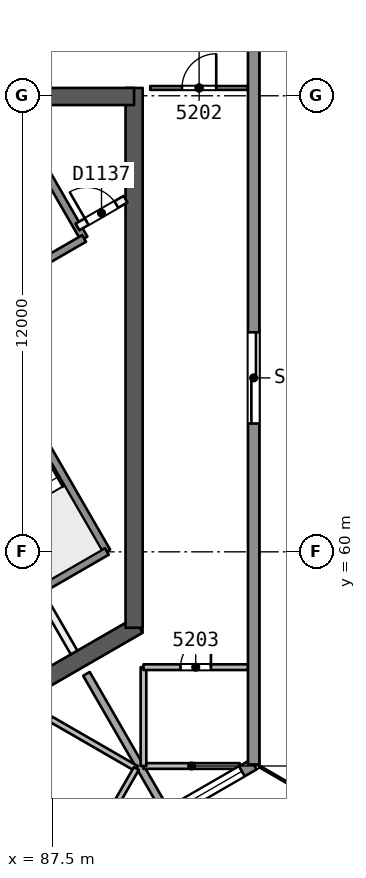
"""IFC4 building model, lengths in metres.
Left out: names, types, materials, properties, quantities, classifications, styles, units other than length and angle.
Written with IfcOpenShell. Run it as: python <this file> out.ifc"""

import sys

from ifc_helpers import new_model, si_unit, direction, frame, frame_2d, origin, place, context, subcontext, project, spatial, rectangle, extrude, element, fill, save


model = new_model("IFC4")
c1 = context("Model", 3, precision=1e-05, world=origin(), true_north=direction((0.0, 1.0)))
c2 = subcontext(c1, "Body", "Model", "MODEL_VIEW")
j1 = project(units=[si_unit("LENGTHUNIT", "METRE"), si_unit("PLANEANGLEUNIT", "RADIAN")], contexts=[c1])
p1 = place(None, origin())
s1 = spatial("IfcSite", under=j1, at=p1, CompositionType="ELEMENT")
p2 = place(p1, origin())
s2 = spatial("IfcBuilding", under=s1, at=p2, CompositionType="ELEMENT")
p3 = place(p2, frame((0.0, 0.0, 213.2)))
s3 = spatial("IfcBuildingStorey", under=s2, at=p3, CompositionType="ELEMENT", Elevation=213.2)
p4 = place(p3, frame((86.723, 56.31, 0.0), z_axis=(0.0, 0.0, 1.0), x_axis=(0.866042179588, 0.49997094233, 0.0)))
e1 = element("IfcWall", 1, at=p4, inside=s3, PredefinedType="SHEAR", context=c2, shape_type="SweptSolid", body=[
    extrude(rectangle(XDim=3.515, YDim=0.45, at=frame_2d((1.758, 0.0))), origin(), (0.0, 0.0, 1.0), 3.7),
])
p5 = place(p3, frame((89.655, 58.002, 0.0), z_axis=(0.0, 0.0, 1.0), x_axis=(0.0, 1.0, 0.0)))
e2 = element("IfcWall", 2, at=p5, inside=s3, PredefinedType="SHEAR", context=c2, shape_type="SweptSolid", body=[
    extrude(rectangle(XDim=14.204, YDim=0.45, at=frame_2d((7.102, 0.0))), origin(), (0.0, 0.0, 1.0), 3.7),
])
p6 = place(p3, frame((89.655, 71.981, 0.0), z_axis=(0.0, 0.0, 1.0), x_axis=(-1.0, 0.0, 0.0)))
e3 = element("IfcWall", 3, at=p6, inside=s3, PredefinedType="SHEAR", context=c2, shape_type="SweptSolid", body=[
    extrude(rectangle(XDim=10.155, YDim=0.45, at=frame_2d((5.078, 0.0))), origin(), (0.0, 0.0, 1.0), 3.7),
])
p7 = place(p6, frame((8.005, 0.0, 0.0)))
e4 = element("IfcOpeningElement", 4, at=p7, cuts=e3, PredefinedType="OPENING", context=c2, shape_type="SweptSolid", body=[
    extrude(rectangle(XDim=1.2, YDim=2.1, at=frame_2d((0.6, 1.05))), frame((0.0, 0.235, 0.0), z_axis=(0.0, -1.0, 0.0), x_axis=(1.0, 0.0, 0.0)), (0.0, 0.0, 1.0), 0.471),
])
p8 = place(p3, frame((90.079, 72.206, 0.0), z_axis=(0.0, 0.0, 1.0), x_axis=(1.0, 0.0, 0.0)))
e5 = element("IfcWall", 5, at=p8, inside=s3, PredefinedType="PARTITIONING", context=c2, shape_type="SweptSolid", body=[
    extrude(rectangle(XDim=2.573, YDim=0.1, at=frame_2d((1.287, 0.0))), origin(), (0.0, 0.0, 1.0), 3.3),
])
p9 = place(p8, frame((0.837, 0.0, 0.0)))
e6 = element("IfcOpeningElement", 6, at=p9, cuts=e5, PredefinedType="OPENING", context=c2, shape_type="SweptSolid", body=[
    extrude(rectangle(XDim=0.9, YDim=2.1, at=frame_2d((0.45, 1.05))), frame((0.0, 0.061, 0.0), z_axis=(0.0, -1.0, 0.0), x_axis=(1.0, 0.0, 0.0)), (0.0, 0.0, 1.0), 0.121),
])
p10 = place(p3, frame((92.436, 54.365, 0.0), z_axis=(0.0, 0.0, 1.0), x_axis=(-1.0, 0.0, 0.0)))
e7 = element("IfcWall", 7, at=p10, inside=s3, PredefinedType="PARTITIONING", context=c2, shape_type="SweptSolid", body=[
    extrude(rectangle(XDim=2.534, YDim=0.15, at=frame_2d((1.267, 0.0))), origin(), (0.0, 0.0, 1.0), 3.3),
])
p11 = place(p3, frame((89.902, 54.365, 0.0), z_axis=(0.0, 0.0, 1.0), x_axis=(0.0, 1.0, 0.0)))
e8 = element("IfcWall", 8, at=p11, inside=s3, PredefinedType="PARTITIONING", context=c2, shape_type="SweptSolid", body=[
    extrude(rectangle(XDim=2.6, YDim=0.15, at=frame_2d((1.3, 0.0))), origin(), (0.0, 0.0, 1.0), 3.3),
])
p12 = place(p3, frame((89.902, 56.965, 0.0), z_axis=(0.0, 0.0, 1.0), x_axis=(1.0, 0.0, 0.0)))
e9 = element("IfcWall", 9, at=p12, inside=s3, PredefinedType="PARTITIONING", context=c2, shape_type="SweptSolid", body=[
    extrude(rectangle(XDim=2.751, YDim=0.15, at=frame_2d((1.375, 0.0))), origin(), (0.0, 0.0, 1.0), 3.3),
])
p13 = place(p12, frame((0.975, 0.0, 0.0)))
e10 = element("IfcOpeningElement", 10, at=p13, cuts=e9, PredefinedType="OPENING", context=c2, shape_type="SweptSolid", body=[
    extrude(rectangle(XDim=0.8, YDim=2.1, at=frame_2d((0.4, 1.05))), frame((0.0, 0.085, 0.0), z_axis=(0.0, -1.0, 0.0), x_axis=(1.0, 0.0, 0.0)), (0.0, 0.0, 1.0), 0.171),
])
p14 = place(p3, frame((88.401, 56.789, 0.0), z_axis=(0.0, 0.0, 1.0), x_axis=(0.499979154163, -0.8660374388, 0.0)))
e11 = element("IfcWall", 11, at=p14, inside=s3, PredefinedType="PARTITIONING", context=c2, shape_type="SweptSolid", body=[
    extrude(rectangle(XDim=4.116, YDim=0.2, at=frame_2d((2.058, 0.0))), origin(), (0.0, 0.0, 1.0), 3.3),
])
p15 = place(p3, frame((86.087, 53.216, 0.0), z_axis=(0.0, 0.0, 1.0), x_axis=(0.500052815053, 0.865994908852, 0.0)))
e12 = element("IfcWall", 12, at=p15, inside=s3, PredefinedType="PARTITIONING", context=c2, shape_type="SweptSolid", body=[
    extrude(rectangle(XDim=2.751, YDim=0.15, at=frame_2d((1.375, 0.0))), origin(), (0.0, 0.0, 1.0), 3.3),
])
p16 = place(p15, frame((0.975, 0.0, 0.0)))
e13 = element("IfcOpeningElement", 13, at=p16, cuts=e12, PredefinedType="OPENING", context=c2, shape_type="SweptSolid", body=[
    extrude(rectangle(XDim=0.8, YDim=2.1, at=frame_2d((0.4, 1.05))), frame((0.0, 0.085, 0.0), z_axis=(0.0, -1.0, 0.0), x_axis=(1.0, 0.0, 0.0)), (0.0, 0.0, 1.0), 0.171),
])
p17 = place(p3, frame((87.463, 55.598, 0.0), z_axis=(0.0, 0.0, 1.0), x_axis=(0.866062058628, -0.499936506574, 0.0)))
e14 = element("IfcWall", 14, at=p17, inside=s3, PredefinedType="PARTITIONING", context=c2, shape_type="SweptSolid", body=[
    extrude(rectangle(XDim=2.6, YDim=0.15, at=frame_2d((1.3, 0.0))), origin(), (0.0, 0.0, 1.0), 3.3),
])
p18 = place(p3, frame((89.715, 54.298, 0.0), z_axis=(0.0, 0.0, 1.0), x_axis=(-0.50006051662, -0.865990461678, 0.0)))
e15 = element("IfcWall", 15, at=p18, inside=s3, PredefinedType="PARTITIONING", context=c2, shape_type="SweptSolid", body=[
    extrude(rectangle(XDim=2.605, YDim=0.15, at=frame_2d((1.302, 0.0))), origin(), (0.0, 0.0, 1.0), 3.3),
])
p19 = place(p3, frame((92.801, 54.404, 0.0), z_axis=(0.0, 0.0, 1.0), x_axis=(-0.866014017669, -0.500019720812, 0.0)))
e16 = element("IfcWall", 16, at=p19, inside=s3, PredefinedType="SOLIDWALL", context=c2, shape_type="SweptSolid", body=[
    extrude(rectangle(XDim=5.237, YDim=0.3, at=frame_2d((2.619, 0.0))), origin(), (0.0, 0.0, 1.0), 3.3),
])
p20 = place(p19, frame((0.358, 0.0, 0.9)))
e17 = element("IfcOpeningElement", 17, at=p20, cuts=e16, PredefinedType="OPENING", context=c2, shape_type="SweptSolid", body=[
    extrude(rectangle(XDim=1.8, YDim=1.5, at=frame_2d((0.9, 0.75))), frame((0.0, 0.161, 0.0), z_axis=(0.0, -1.0, 0.0), x_axis=(1.0, 0.0, 0.0)), (0.0, 0.0, 1.0), 0.321),
])
p21 = place(p19, frame((3.089, 0.0, 0.9)))
e18 = element("IfcOpeningElement", 18, at=p21, cuts=e16, PredefinedType="OPENING", context=c2, shape_type="SweptSolid", body=[
    extrude(rectangle(XDim=1.8, YDim=1.5, at=frame_2d((0.9, 0.75))), frame((0.0, 0.161, 0.0), z_axis=(0.0, -1.0, 0.0), x_axis=(1.0, 0.0, 0.0)), (0.0, 0.0, 1.0), 0.321),
])
p22 = place(p3, frame((92.801, 105.596, 0.0), z_axis=(0.0, 0.0, 1.0), x_axis=(0.0, -1.0, 0.0)))
e19 = element("IfcWall", 19, at=p22, inside=s3, PredefinedType="SOLIDWALL", context=c2, shape_type="SweptSolid", body=[
    extrude(rectangle(XDim=51.191, YDim=0.3, at=frame_2d((25.596, 0.0))), origin(), (0.0, 0.0, 1.0), 3.3),
])
p23 = place(p22, frame((9.996, 0.0, 0.0)))
e20 = element("IfcOpeningElement", 20, at=p23, cuts=e19, PredefinedType="OPENING", context=c2, shape_type="SweptSolid", body=[
    extrude(rectangle(XDim=2.4, YDim=2.4, at=frame_2d((1.2, 1.2))), frame((0.0, 0.161, 0.0), z_axis=(0.0, -1.0, 0.0), x_axis=(1.0, 0.0, 0.0)), (0.0, 0.0, 1.0), 0.321),
])
p24 = place(p22, frame((29.072, 0.0, 0.0)))
e21 = element("IfcOpeningElement", 21, at=p24, cuts=e19, PredefinedType="OPENING", context=c2, shape_type="SweptSolid", body=[
    extrude(rectangle(XDim=2.4, YDim=2.4, at=frame_2d((1.2, 1.2))), frame((0.0, 0.161, 0.0), z_axis=(0.0, -1.0, 0.0), x_axis=(1.0, 0.0, 0.0)), (0.0, 0.0, 1.0), 0.321),
])
p25 = place(p22, frame((39.819, 0.0, 0.0)))
e22 = element("IfcOpeningElement", 22, at=p25, cuts=e19, PredefinedType="OPENING", context=c2, shape_type="SweptSolid", body=[
    extrude(rectangle(XDim=2.4, YDim=2.4, at=frame_2d((1.2, 1.2))), frame((0.0, 0.161, 0.0), z_axis=(0.0, -1.0, 0.0), x_axis=(1.0, 0.0, 0.0)), (0.0, 0.0, 1.0), 0.321),
])
p26 = place(p22, frame((23.616, 0.0, 0.0)))
e23 = element("IfcOpeningElement", 23, at=p26, cuts=e19, PredefinedType="OPENING", context=c2, shape_type="SweptSolid", body=[
    extrude(rectangle(XDim=2.4, YDim=2.4, at=frame_2d((1.2, 1.2))), frame((0.0, 0.161, 0.0), z_axis=(0.0, -1.0, 0.0), x_axis=(1.0, 0.0, 0.0)), (0.0, 0.0, 1.0), 0.321),
])
p27 = place(p3, frame((88.266, 51.786, 0.0), z_axis=(0.0, 0.0, 1.0), x_axis=(-0.866026349667, 0.49999836168, 0.0)))
e24 = element("IfcWall", 24, at=p27, inside=s3, PredefinedType="SOLIDWALL", context=c2, shape_type="SweptSolid", body=[
    extrude(rectangle(XDim=51.192, YDim=0.3, at=frame_2d((25.596, 0.0))), origin(), (0.0, 0.0, 1.0), 3.3),
])
p28 = place(p27, frame((24.864, 0.0, 0.0)))
e25 = element("IfcOpeningElement", 25, at=p28, cuts=e24, PredefinedType="OPENING", context=c2, shape_type="SweptSolid", body=[
    extrude(rectangle(XDim=2.4, YDim=2.4, at=frame_2d((1.2, 1.2))), frame((0.0, 0.161, 0.0), z_axis=(0.0, -1.0, 0.0), x_axis=(1.0, 0.0, 0.0)), (0.0, 0.0, 1.0), 0.321),
])
p29 = place(p27, frame((19.719, 0.0, 0.0)))
e26 = element("IfcOpeningElement", 26, at=p29, cuts=e24, PredefinedType="OPENING", context=c2, shape_type="SweptSolid", body=[
    extrude(rectangle(XDim=2.4, YDim=2.4, at=frame_2d((1.2, 1.2))), frame((0.0, 0.161, 0.0), z_axis=(0.0, -1.0, 0.0), x_axis=(1.0, 0.0, 0.0)), (0.0, 0.0, 1.0), 0.321),
])
p30 = place(p27, frame((8.993, 0.0, 0.0)))
e27 = element("IfcOpeningElement", 27, at=p30, cuts=e24, PredefinedType="OPENING", context=c2, shape_type="SweptSolid", body=[
    extrude(rectangle(XDim=2.4, YDim=2.4, at=frame_2d((1.2, 1.2))), frame((0.0, 0.161, 0.0), z_axis=(0.0, -1.0, 0.0), x_axis=(1.0, 0.0, 0.0)), (0.0, 0.0, 1.0), 0.321),
])
p31 = place(p27, frame((38.484, 0.0, 0.0)))
e28 = element("IfcOpeningElement", 28, at=p31, cuts=e24, PredefinedType="OPENING", context=c2, shape_type="SweptSolid", body=[
    extrude(rectangle(XDim=2.4, YDim=2.4, at=frame_2d((1.2, 1.2))), frame((0.0, 0.161, 0.0), z_axis=(0.0, -1.0, 0.0), x_axis=(1.0, 0.0, 0.0)), (0.0, 0.0, 1.0), 0.321),
])
p32 = place(p3, frame((87.09, 59.06, 0.0), z_axis=(0.0, 0.0, 1.0), x_axis=(0.500011643316, -0.866018681408, 0.0)))
e29 = element("IfcWall", 29, at=p32, inside=s3, PredefinedType="PARTITIONING", context=c2, shape_type="SweptSolid", body=[
    extrude(rectangle(XDim=1.973, YDim=0.2, at=frame_2d((0.987, 0.0))), origin(), (0.0, 0.0, 1.0), 3.3),
])
p33 = place(p3, frame((85.087, 66.679, 0.0), z_axis=(0.0, 0.0, 1.0), x_axis=(0.500019787375, -0.866013979237, 0.0)))
e30 = element("IfcWall", 30, at=p33, inside=s3, PredefinedType="SOLIDWALL", context=c2, shape_type="SweptSolid", body=[
    extrude(rectangle(XDim=7.7, YDim=0.2, at=frame_2d((3.85, 0.0))), origin(), (0.0, 0.0, 1.0), 3.3),
])
p34 = place(p33, frame((0.55, 0.0, 0.0)))
e31 = element("IfcOpeningElement", 31, at=p34, cuts=e30, PredefinedType="OPENING", context=c2, shape_type="SweptSolid", body=[
    extrude(rectangle(XDim=1.1, YDim=2.1, at=frame_2d((0.55, 1.05))), frame((0.0, 0.11, 0.0), z_axis=(0.0, -1.0, 0.0), x_axis=(1.0, 0.0, 0.0)), (0.0, 0.0, 1.0), 0.221),
])
p35 = place(p3, frame((86.965, 70.626, 0.0), z_axis=(0.0, 0.0, 1.0), x_axis=(0.499996545922, -0.866027397988, 0.0)))
e32 = element("IfcWall", 32, at=p35, inside=s3, PredefinedType="SOLIDWALL", context=c2, shape_type="SweptSolid", body=[
    extrude(rectangle(XDim=2.75, YDim=0.2, at=frame_2d((1.375, 0.0))), origin(), (0.0, 0.0, 1.0), 3.3),
])
p36 = place(p3, frame((88.165, 68.548, 0.0), z_axis=(0.0, 0.0, 1.0), x_axis=(0.866013036001, 0.500021421018, 0.0)))
e33 = element("IfcWall", 33, at=p36, inside=s3, PredefinedType="PARTITIONING", context=c2, shape_type="SweptSolid", body=[
    extrude(rectangle(XDim=1.461, YDim=0.2, at=frame_2d((0.73, 0.0))), origin(), (0.0, 0.0, 1.0), 3.3),
])
p37 = place(p36, frame((0.281, 0.0, 0.0)))
e34 = element("IfcOpeningElement", 34, at=p37, cuts=e33, PredefinedType="OPENING", context=c2, shape_type="SweptSolid", body=[
    extrude(rectangle(XDim=0.9, YDim=2.1, at=frame_2d((0.45, 1.05))), frame((0.0, 0.11, 0.0), z_axis=(0.0, -1.0, 0.0), x_axis=(1.0, 0.0, 0.0)), (0.0, 0.0, 1.0), 0.221),
])
p38 = place(p3, frame((86.348, 67.095, 0.0), z_axis=(0.0, 0.0, 1.0), x_axis=(0.86602648383, 0.499998129301, 0.0)))
e35 = element("IfcWall", 35, at=p38, inside=s3, PredefinedType="SOLIDWALL", context=c2, shape_type="SweptSolid", body=[
    extrude(rectangle(XDim=2.3, YDim=0.2, at=frame_2d((1.15, 0.0))), origin(), (0.0, 0.0, 1.0), 3.3),
])
p39 = place(p3, frame((85.343, 57.935, 0.0), z_axis=(0.0, 0.0, 1.0), x_axis=(0.866004344652, 0.500036473714, 0.0)))
e36 = element("IfcWall", 36, at=p39, inside=s3, PredefinedType="SOLIDWALL", context=c2, shape_type="SweptSolid", body=[
    extrude(rectangle(XDim=4.15, YDim=0.2, at=frame_2d((2.075, 0.0))), origin(), (0.0, 0.0, 1.0), 3.3),
])
p40 = place(p9, origin())
e37 = element("IfcDoor", 37, at=p40, inside=s3, OperationType="SINGLE_SWING_RIGHT", PredefinedType="NOTDEFINED", context=c2, shape_type="SweptSolid", body=[
    extrude(rectangle(XDim=0.9, YDim=2.1, at=frame_2d((0.45, 1.05))), frame((0.0, 0.025, 0.0), z_axis=(0.0, -1.0, 0.0), x_axis=(1.0, 0.0, 0.0)), (0.0, 0.0, 1.0), 0.05),
])
fill(e6, e37)
p41 = place(p13, origin())
e38 = element("IfcDoor", 38, at=p41, inside=s3, OperationType="SINGLE_SWING_RIGHT", PredefinedType="NOTDEFINED", context=c2, shape_type="SweptSolid", body=[
    extrude(rectangle(XDim=0.8, YDim=2.1, at=frame_2d((0.4, 1.05))), frame((0.0, 0.025, 0.0), z_axis=(0.0, -1.0, 0.0), x_axis=(1.0, 0.0, 0.0)), (0.0, 0.0, 1.0), 0.05),
])
fill(e10, e38)
p42 = place(p20, origin())
e39 = element("IfcWindow", 39, at=p42, inside=s3, PartitioningType="SINGLE_PANEL", PredefinedType="WINDOW", context=c2, shape_type="SweptSolid", body=[
    extrude(rectangle(XDim=1.8, YDim=1.5, at=frame_2d((0.9, 0.75))), frame((0.0, 0.03, 0.0), z_axis=(0.0, -1.0, 0.0), x_axis=(1.0, 0.0, 0.0)), (0.0, 0.0, 1.0), 0.06),
])
fill(e17, e39)
p43 = place(p25, origin())
e40 = element("IfcDoor", 40, at=p43, inside=s3, OperationType="SLIDING_TO_LEFT", PredefinedType="NOTDEFINED", context=c2, shape_type="SweptSolid", body=[
    extrude(rectangle(XDim=2.4, YDim=2.4, at=frame_2d((1.2, 1.2))), frame((0.0, 0.025, 0.0), z_axis=(0.0, -1.0, 0.0), x_axis=(1.0, 0.0, 0.0)), (0.0, 0.0, 1.0), 0.05),
])
fill(e22, e40)
p44 = place(p37, origin())
e41 = element("IfcDoor", 41, at=p44, inside=s3, OperationType="SINGLE_SWING_LEFT", PredefinedType="NOTDEFINED", context=c2, shape_type="SweptSolid", body=[
    extrude(rectangle(XDim=0.9, YDim=2.1, at=frame_2d((0.45, 1.05))), frame((0.0, 0.025, 0.0), z_axis=(0.0, -1.0, 0.0), x_axis=(1.0, 0.0, 0.0)), (0.0, 0.0, 1.0), 0.05),
])
fill(e34, e41)
save(model, sys.argv[1])
